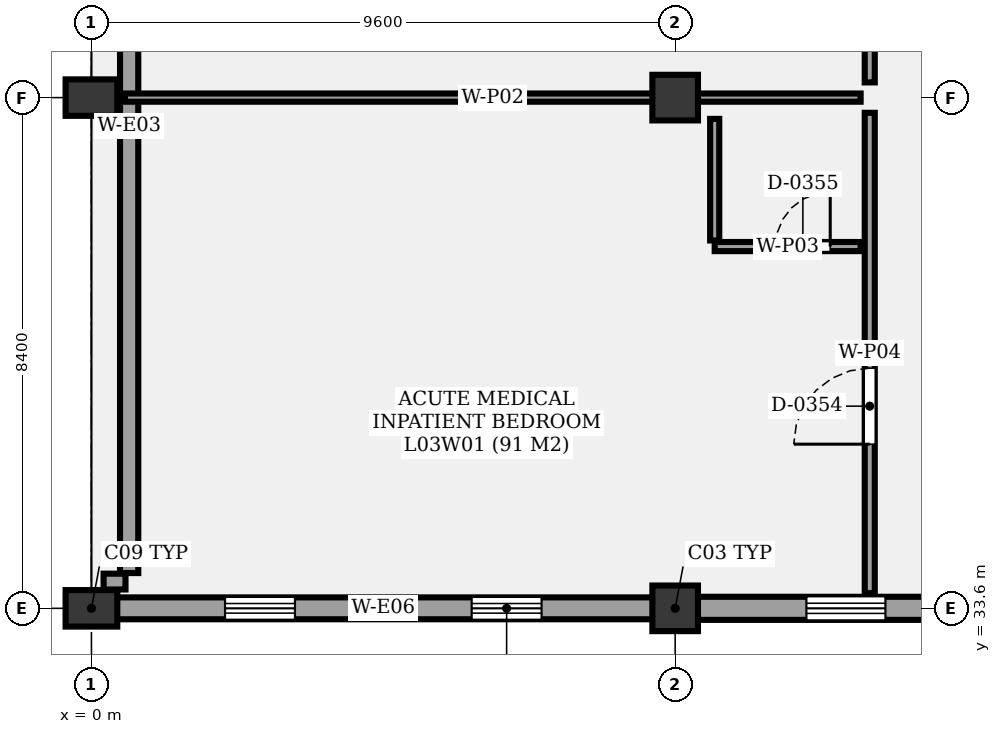
"""IFC4 building model, lengths in metres.
Left out: names, types, materials, properties, quantities, classifications, styles, units other than length and angle.
Written with IfcOpenShell. Run it as: python <this file> out.ifc"""

import sys

from ifc_helpers import new_model, si_unit, direction, frame, frame_2d, origin, origin_2d, place, context, subcontext, project, spatial, rectangle, extrude, element, fill, save


model = new_model("IFC4")
c1 = context("Model", 3, precision=1e-05, world=origin(), true_north=direction((0.0, 1.0)))
c2 = subcontext(c1, "Body", "Model", "MODEL_VIEW")
j1 = project(units=[si_unit("LENGTHUNIT", "METRE"), si_unit("PLANEANGLEUNIT", "RADIAN")], contexts=[c1])
p1 = place(None, origin())
s1 = spatial("IfcSite", under=j1, at=p1, CompositionType="ELEMENT")
p2 = place(p1, origin())
s2 = spatial("IfcBuilding", under=s1, at=p2, CompositionType="ELEMENT")
p3 = place(p2, frame((0.0, 0.0, 13.5)))
s3 = spatial("IfcBuildingStorey", under=s2, at=p3, CompositionType="ELEMENT", Elevation=13.5)
for number, where, z_axis, x_axis in (
    (1, (0.0, 33.6, 0.0), (0.0, 0.0, 1.0), (1.0, 0.0, 0.0)),
    (2, (0.0, 42.0, 0.0), (0.0, 0.0, 1.0), (1.0, 0.0, 0.0)),
):
    element("IfcColumn", number, at=place(p3, frame(where, z_axis=z_axis, x_axis=x_axis)), inside=s3, PredefinedType="COLUMN", context=c2, shape_type="SweptSolid", body=[
        extrude(rectangle(XDim=0.85, YDim=0.6, at=origin_2d()), origin(), (0.0, 0.0, 1.0), 4.3),
    ])
for number, where, z_axis, x_axis in (
    (3, (9.6, 33.6, 0.0), (0.0, 0.0, 1.0), (1.0, 0.0, 0.0)),
    (4, (9.6, 42.0, 0.0), (0.0, 0.0, 1.0), (1.0, 0.0, 0.0)),
):
    element("IfcColumn", number, at=place(p3, frame(where, z_axis=z_axis, x_axis=x_axis)), inside=s3, PredefinedType="COLUMN", context=c2, shape_type="SweptSolid", body=[
        extrude(rectangle(XDim=0.75, YDim=0.75, at=origin_2d()), origin(), (0.0, 0.0, 1.0), 4.3),
    ])
p4 = place(p3, frame((9.6, 33.6, 0.0), z_axis=(0.0, 0.0, 1.0), x_axis=(-1.0, 0.0, 0.0)))
e5 = element("IfcWall", 5, at=p4, inside=s3, PredefinedType="SOLIDWALL", context=c2, shape_type="SweptSolid", body=[
    extrude(rectangle(XDim=9.6, YDim=0.36, at=frame_2d((4.8, 0.0))), origin(), (0.0, 0.0, 1.0), 3.49),
])
p5 = place(p4, frame((2.197, 0.0, 0.85)))
e6 = element("IfcOpeningElement", 6, at=p5, cuts=e5, PredefinedType="OPENING", context=c2, shape_type="SweptSolid", body=[
    extrude(rectangle(XDim=1.15, YDim=1.2, at=frame_2d((0.575, 0.6))), frame((0.0, 0.19, 0.0), z_axis=(0.0, -1.0, 0.0), x_axis=(1.0, 0.0, 0.0)), (0.0, 0.0, 1.0), 0.38),
])
p6 = place(p4, frame((6.253, 0.0, 0.85)))
e7 = element("IfcOpeningElement", 7, at=p6, cuts=e5, PredefinedType="OPENING", context=c2, shape_type="SweptSolid", body=[
    extrude(rectangle(XDim=1.15, YDim=1.2, at=frame_2d((0.575, 0.6))), frame((0.0, 0.19, 0.0), z_axis=(0.0, -1.0, 0.0), x_axis=(1.0, 0.0, 0.0)), (0.0, 0.0, 1.0), 0.38),
])
p7 = place(p3, frame((19.2, 33.6, 0.0), z_axis=(0.0, 0.0, 1.0), x_axis=(-1.0, 0.0, 0.0)))
e8 = element("IfcWall", 8, at=p7, inside=s3, PredefinedType="SOLIDWALL", context=c2, shape_type="SweptSolid", body=[
    extrude(rectangle(XDim=9.6, YDim=0.38, at=frame_2d((4.8, 0.0))), origin(), (0.0, 0.0, 1.0), 3.49),
])
p8 = place(p7, frame((2.158, 0.0, 0.85)))
e9 = element("IfcOpeningElement", 9, at=p8, cuts=e8, PredefinedType="OPENING", context=c2, shape_type="SweptSolid", body=[
    extrude(rectangle(XDim=1.3, YDim=1.2, at=frame_2d((0.65, 0.6))), frame((0.0, 0.2, 0.0), z_axis=(0.0, -1.0, 0.0), x_axis=(1.0, 0.0, 0.0)), (0.0, 0.0, 1.0), 0.4),
])
p9 = place(p7, frame((6.142, 0.0, 0.85)))
e10 = element("IfcOpeningElement", 10, at=p9, cuts=e8, PredefinedType="OPENING", context=c2, shape_type="SweptSolid", body=[
    extrude(rectangle(XDim=1.3, YDim=1.2, at=frame_2d((0.65, 0.6))), frame((0.0, 0.2, 0.0), z_axis=(0.0, -1.0, 0.0), x_axis=(1.0, 0.0, 0.0)), (0.0, 0.0, 1.0), 0.4),
])
p10 = place(p3, frame((0.2, 34.04, 0.0), z_axis=(0.0, 0.0, 1.0), x_axis=(1.0, 0.0, 0.0)))
e11 = element("IfcWall", 11, at=p10, inside=s3, PredefinedType="SOLIDWALL", context=c2, shape_type="SweptSolid", body=[
    extrude(rectangle(XDim=0.36, YDim=0.26, at=frame_2d((0.18, 0.0))), origin(), (0.0, 0.0, 1.0), 3.49),
])
p11 = place(p3, frame((0.62, 34.18, 0.0), z_axis=(0.0, 0.0, 1.0), x_axis=(0.0, 1.0, 0.0)))
e12 = element("IfcWall", 12, at=p11, inside=s3, PredefinedType="SOLIDWALL", context=c2, shape_type="SweptSolid", body=[
    extrude(rectangle(XDim=32.6, YDim=0.3, at=frame_2d((16.3, 0.0))), origin(), (0.0, 0.0, 1.0), 3.49),
])
p12 = place(p3, frame((12.8, 33.85, 0.0), z_axis=(0.0, 0.0, 1.0), x_axis=(0.0, 1.0, 0.0)))
e13 = element("IfcWall", 13, at=p12, inside=s3, PredefinedType="PARTITIONING", context=c2, shape_type="SweptSolid", body=[
    extrude(rectangle(XDim=7.9, YDim=0.165, at=frame_2d((3.95, 0.0))), origin(), (0.0, 0.0, 1.0), 3.4),
])
p13 = place(p12, frame((2.45, 0.0, 0.0)))
e14 = element("IfcOpeningElement", 14, at=p13, cuts=e13, PredefinedType="OPENING", context=c2, shape_type="SweptSolid", body=[
    extrude(rectangle(XDim=1.25, YDim=2.2, at=frame_2d((0.625, 1.1))), frame((0.0, 0.093, 0.0), z_axis=(0.0, -1.0, 0.0), x_axis=(1.0, 0.0, 0.0)), (0.0, 0.0, 1.0), 0.185),
])
p14 = place(p3, frame((10.25, 39.55, 0.0), z_axis=(0.0, 0.0, 1.0), x_axis=(1.0, 0.0, 0.0)))
e15 = element("IfcWall", 15, at=p14, inside=s3, PredefinedType="PARTITIONING", context=c2, shape_type="SweptSolid", body=[
    extrude(rectangle(XDim=2.4, YDim=0.15, at=frame_2d((1.2, 0.0))), origin(), (0.0, 0.0, 1.0), 3.4),
])
p15 = place(p14, frame((1.0, 0.0, 0.0)))
e16 = element("IfcOpeningElement", 16, at=p15, cuts=e15, PredefinedType="OPENING", context=c2, shape_type="SweptSolid", body=[
    extrude(rectangle(XDim=0.9, YDim=2.1, at=frame_2d((0.45, 1.05))), frame((0.0, 0.085, 0.0), z_axis=(0.0, -1.0, 0.0), x_axis=(1.0, 0.0, 0.0)), (0.0, 0.0, 1.0), 0.17),
])
p16 = place(p3, frame((10.25, 39.65, 0.0), z_axis=(0.0, 0.0, 1.0), x_axis=(0.0, 1.0, 0.0)))
e17 = element("IfcWall", 17, at=p16, inside=s3, PredefinedType="PARTITIONING", context=c2, shape_type="SweptSolid", body=[
    extrude(rectangle(XDim=2.0, YDim=0.15, at=frame_2d((1.0, 0.0))), origin(), (0.0, 0.0, 1.0), 3.4),
])
p17 = place(p3, frame((12.8, 42.25, 0.0), z_axis=(0.0, 0.0, 1.0), x_axis=(0.0, 1.0, 0.0)))
e18 = element("IfcWall", 18, at=p17, inside=s3, PredefinedType="PARTITIONING", context=c2, shape_type="SweptSolid", body=[
    extrude(rectangle(XDim=7.9, YDim=0.165, at=frame_2d((3.95, 0.0))), origin(), (0.0, 0.0, 1.0), 3.4),
])
p18 = place(p17, frame((2.45, 0.0, 0.0)))
e19 = element("IfcOpeningElement", 19, at=p18, cuts=e18, PredefinedType="OPENING", context=c2, shape_type="SweptSolid", body=[
    extrude(rectangle(XDim=1.35, YDim=2.4, at=frame_2d((0.675, 1.2))), frame((0.0, 0.093, 0.0), z_axis=(0.0, -1.0, 0.0), x_axis=(1.0, 0.0, 0.0)), (0.0, 0.0, 1.0), 0.185),
])
p19 = place(p3, frame((0.55, 42.0, 0.0), z_axis=(0.0, 0.0, 1.0), x_axis=(1.0, 0.0, 0.0)))
e20 = element("IfcWall", 20, at=p19, inside=s3, PredefinedType="PARTITIONING", context=c2, shape_type="SweptSolid", body=[
    extrude(rectangle(XDim=12.1, YDim=0.135, at=frame_2d((6.05, 0.0))), origin(), (0.0, 0.0, 1.0), 3.4),
])
p20 = place(p5, origin())
e21 = element("IfcWindow", 21, at=p20, inside=s3, PartitioningType="SINGLE_PANEL", PredefinedType="WINDOW", context=c2, shape_type="SweptSolid", body=[
    extrude(rectangle(XDim=1.15, YDim=1.2, at=frame_2d((0.575, 0.6))), frame((0.0, 0.03, 0.0), z_axis=(0.0, -1.0, 0.0), x_axis=(1.0, 0.0, 0.0)), (0.0, 0.0, 1.0), 0.06),
])
fill(e6, e21)
p21 = place(p6, origin())
e22 = element("IfcWindow", 22, at=p21, inside=s3, PartitioningType="SINGLE_PANEL", PredefinedType="WINDOW", context=c2, shape_type="SweptSolid", body=[
    extrude(rectangle(XDim=1.15, YDim=1.2, at=frame_2d((0.575, 0.6))), frame((0.0, 0.03, 0.0), z_axis=(0.0, -1.0, 0.0), x_axis=(1.0, 0.0, 0.0)), (0.0, 0.0, 1.0), 0.06),
])
fill(e7, e22)
p22 = place(p9, origin())
e23 = element("IfcWindow", 23, at=p22, inside=s3, PartitioningType="SINGLE_PANEL", PredefinedType="WINDOW", context=c2, shape_type="SweptSolid", body=[
    extrude(rectangle(XDim=1.3, YDim=1.2, at=frame_2d((0.65, 0.6))), frame((0.0, 0.03, 0.0), z_axis=(0.0, -1.0, 0.0), x_axis=(1.0, 0.0, 0.0)), (0.0, 0.0, 1.0), 0.06),
])
fill(e10, e23)
p23 = place(p13, origin())
e24 = element("IfcDoor", 24, at=p23, inside=s3, OperationType="SINGLE_SWING_LEFT", PredefinedType="DOOR", context=c2, shape_type="SweptSolid", body=[
    extrude(rectangle(XDim=1.25, YDim=2.2, at=frame_2d((0.625, 1.1))), frame((0.0, 0.025, 0.0), z_axis=(0.0, -1.0, 0.0), x_axis=(1.0, 0.0, 0.0)), (0.0, 0.0, 1.0), 0.05),
])
fill(e14, e24)
p24 = place(p15, origin())
e25 = element("IfcDoor", 25, at=p24, inside=s3, OperationType="SINGLE_SWING_RIGHT", PredefinedType="DOOR", context=c2, shape_type="SweptSolid", body=[
    extrude(rectangle(XDim=0.9, YDim=2.1, at=frame_2d((0.45, 1.05))), frame((0.0, 0.025, 0.0), z_axis=(0.0, -1.0, 0.0), x_axis=(1.0, 0.0, 0.0)), (0.0, 0.0, 1.0), 0.05),
])
fill(e16, e25)
save(model, sys.argv[1])
